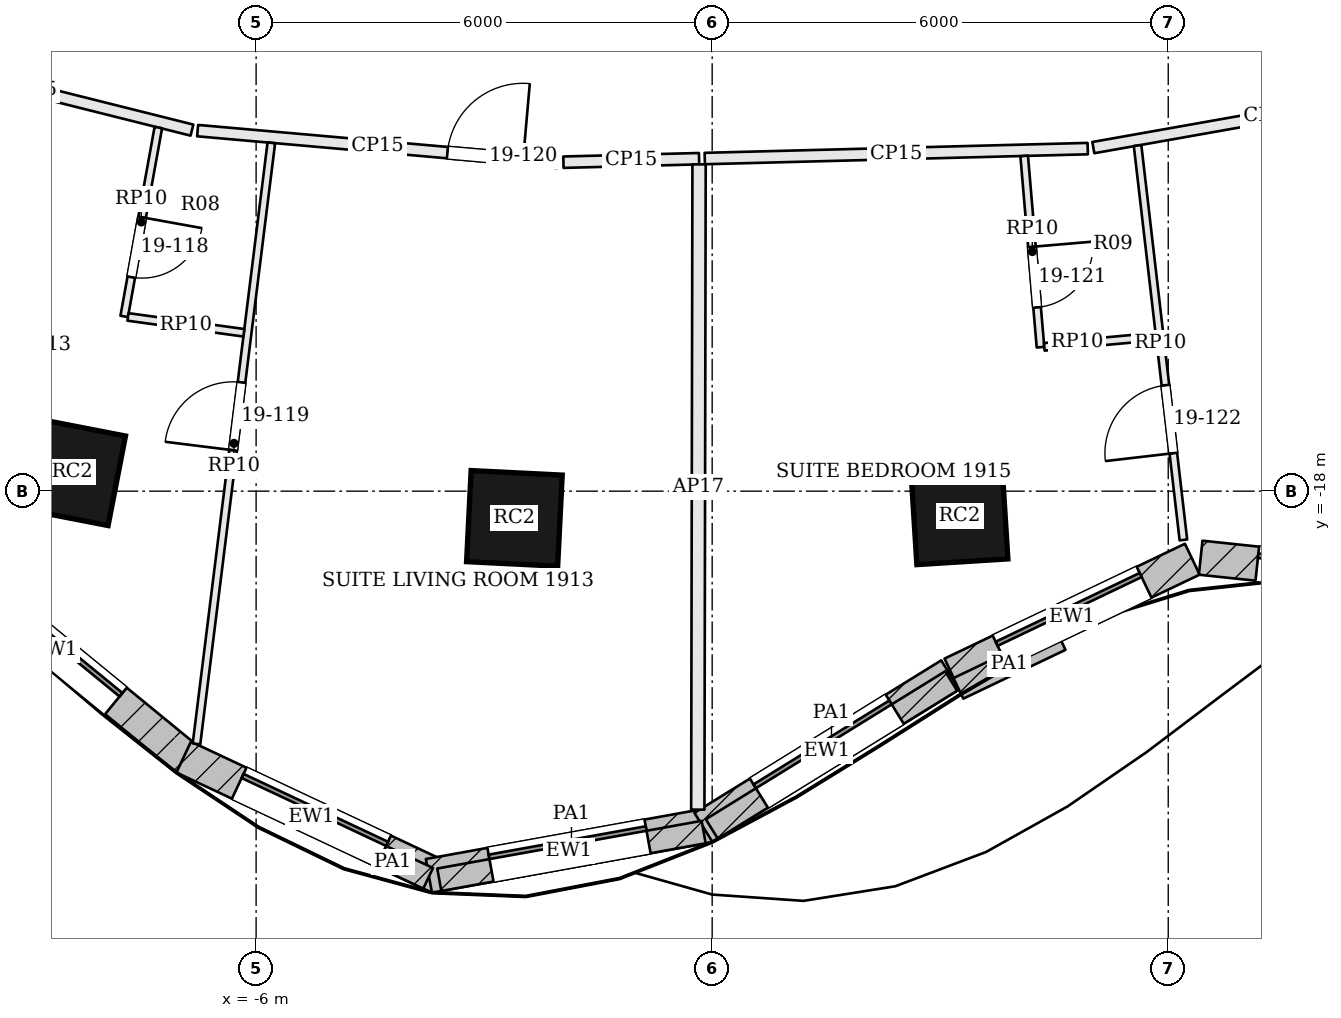
"""IFC4 building model, lengths in metres.
Left out: names, types, materials, properties, quantities, classifications, styles, units other than length and angle.
Written with IfcOpenShell. Run it as: python <this file> out.ifc"""

import sys

from ifc_helpers import new_model, si_unit, direction, frame, frame_2d, origin, origin_2d, place, context, subcontext, project, spatial, rectangle, extrude, element, fill, save


model = new_model("IFC4")
c1 = context("Model", 3, precision=1e-05, world=origin(), true_north=direction((0.0, 1.0)))
c2 = subcontext(c1, "Body", "Model", "MODEL_VIEW")
j1 = project(units=[si_unit("LENGTHUNIT", "METRE"), si_unit("PLANEANGLEUNIT", "RADIAN")], contexts=[c1])
p1 = place(None, origin())
s1 = spatial("IfcSite", under=j1, at=p1, CompositionType="ELEMENT")
p2 = place(p1, origin())
s2 = spatial("IfcBuilding", under=s1, at=p2, CompositionType="ELEMENT")
p3 = place(p2, frame((0.0, 0.0, 85.2)))
s3 = spatial("IfcBuildingStorey", under=s2, at=p3, CompositionType="ELEMENT", Elevation=85.2)
for number, where, z_axis, x_axis in (
    (1, (-8.422, -17.749, 0.0), (0.0, 0.0, 1.0), (0.982, -0.191, 0.0)),
    (2, (-2.602, -18.358, 0.0), (0.0, 0.0, 1.0), (0.999, -0.05, 0.0)),
    (3, (3.254, -18.33, 0.0), (0.0, 0.0, 1.0), (0.998, 0.063, 0.0)),
):
    element("IfcColumn", number, at=place(p3, frame(where, z_axis=z_axis, x_axis=x_axis)), inside=s3, PredefinedType="COLUMN", context=c2, shape_type="SweptSolid", body=[
        extrude(rectangle(XDim=1.2, YDim=1.2, at=origin_2d()), origin(), (0.0, 0.0, 1.0), 3.6),
    ])
p4 = place(p3, frame((-10.407, -18.661, 0.0), z_axis=(0.0, 0.0, 1.0), x_axis=(0.773702458947, -0.633549133864, 0.0)))
e4 = element("IfcWall", 4, at=p4, inside=s3, PredefinedType="SOLIDWALL", context=c2, shape_type="SweptSolid", body=[
    extrude(rectangle(XDim=4.526, YDim=0.45, at=frame_2d((2.263, 0.0))), origin(), (0.0, 0.0, 1.0), 3.4),
])
p5 = place(p4, frame((1.213, 0.0, 0.9)))
e5 = element("IfcOpeningElement", 5, at=p5, cuts=e4, PredefinedType="OPENING", context=c2, shape_type="SweptSolid", body=[
    extrude(rectangle(XDim=2.1, YDim=2.0, at=frame_2d((1.05, 1.0))), frame((0.0, 0.235, 0.0), z_axis=(0.0, -1.0, 0.0), x_axis=(1.0, 0.0, 0.0)), (0.0, 0.0, 1.0), 0.47),
])
p6 = place(p3, frame((-6.953, -21.499, 0.0), z_axis=(0.0, 0.0, 1.0), x_axis=(0.905034581957, -0.425337989676, 0.0)))
e6 = element("IfcWall", 6, at=p6, inside=s3, PredefinedType="SOLIDWALL", context=c2, shape_type="SweptSolid", body=[
    extrude(rectangle(XDim=3.714, YDim=0.45, at=frame_2d((1.857, 0.0))), origin(), (0.0, 0.0, 1.0), 3.4),
])
p7 = place(p6, frame((0.807, 0.0, 0.9)))
e7 = element("IfcOpeningElement", 7, at=p7, cuts=e6, PredefinedType="OPENING", context=c2, shape_type="SweptSolid", body=[
    extrude(rectangle(XDim=2.1, YDim=2.0, at=frame_2d((1.05, 1.0))), frame((0.0, 0.235, 0.0), z_axis=(0.0, -1.0, 0.0), x_axis=(1.0, 0.0, 0.0)), (0.0, 0.0, 1.0), 0.47),
])
p8 = place(p3, frame((-3.727, -23.061, 0.0), z_axis=(0.0, 0.0, 1.0), x_axis=(0.984119180424, 0.177508982087, 0.0)))
e8 = element("IfcWall", 8, at=p8, inside=s3, PredefinedType="SOLIDWALL", context=c2, shape_type="SweptSolid", body=[
    extrude(rectangle(XDim=3.747, YDim=0.45, at=frame_2d((1.873, 0.0))), origin(), (0.0, 0.0, 1.0), 3.4),
])
p9 = place(p8, frame((0.823, 0.0, 0.9)))
e9 = element("IfcOpeningElement", 9, at=p9, cuts=e8, PredefinedType="OPENING", context=c2, shape_type="SweptSolid", body=[
    extrude(rectangle(XDim=2.1, YDim=2.0, at=frame_2d((1.05, 1.0))), frame((0.0, 0.235, 0.0), z_axis=(0.0, -1.0, 0.0), x_axis=(1.0, 0.0, 0.0)), (0.0, 0.0, 1.0), 0.47),
])
p10 = place(p3, frame((-0.115, -22.424, 0.0), z_axis=(0.0, 0.0, 1.0), x_axis=(0.8506970368, 0.525656305564, 0.0)))
e10 = element("IfcWall", 10, at=p10, inside=s3, PredefinedType="SOLIDWALL", context=c2, shape_type="SweptSolid", body=[
    extrude(rectangle(XDim=3.816, YDim=0.45, at=frame_2d((1.908, 0.0))), origin(), (0.0, 0.0, 1.0), 3.4),
])
p11 = place(p10, frame((0.858, 0.0, 0.9)))
e11 = element("IfcOpeningElement", 11, at=p11, cuts=e10, PredefinedType="OPENING", context=c2, shape_type="SweptSolid", body=[
    extrude(rectangle(XDim=2.1, YDim=2.0, at=frame_2d((1.05, 1.0))), frame((0.0, 0.235, 0.0), z_axis=(0.0, -1.0, 0.0), x_axis=(1.0, 0.0, 0.0)), (0.0, 0.0, 1.0), 0.47),
])
p12 = place(p3, frame((3.154, -20.406, 0.0), z_axis=(0.0, 0.0, 1.0), x_axis=(0.902333313, 0.431038968367, 0.0)))
e12 = element("IfcWall", 12, at=p12, inside=s3, PredefinedType="SOLIDWALL", context=c2, shape_type="SweptSolid", body=[
    extrude(rectangle(XDim=3.505, YDim=0.45, at=frame_2d((1.753, 0.0))), origin(), (0.0, 0.0, 1.0), 3.4),
])
p13 = place(p12, frame((0.703, 0.0, 0.9)))
e13 = element("IfcOpeningElement", 13, at=p13, cuts=e12, PredefinedType="OPENING", context=c2, shape_type="SweptSolid", body=[
    extrude(rectangle(XDim=2.1, YDim=2.0, at=frame_2d((1.05, 1.0))), frame((0.0, 0.235, 0.0), z_axis=(0.0, -1.0, 0.0), x_axis=(1.0, 0.0, 0.0)), (0.0, 0.0, 1.0), 0.47),
])
p14 = place(p3, frame((6.427, -18.875, 0.0), z_axis=(0.0, 0.0, 1.0), x_axis=(0.994433468803, -0.10536638992, 0.0)))
e14 = element("IfcWall", 14, at=p14, inside=s3, PredefinedType="SOLIDWALL", context=c2, shape_type="SweptSolid", body=[
    extrude(rectangle(XDim=3.598, YDim=0.45, at=frame_2d((1.799, 0.0))), origin(), (0.0, 0.0, 1.0), 3.4),
])
p15 = place(p14, frame((0.749, 0.0, 0.9)))
e15 = element("IfcOpeningElement", 15, at=p15, cuts=e14, PredefinedType="OPENING", context=c2, shape_type="SweptSolid", body=[
    extrude(rectangle(XDim=2.1, YDim=2.0, at=frame_2d((1.05, 1.0))), frame((0.0, 0.235, 0.0), z_axis=(0.0, -1.0, 0.0), x_axis=(1.0, 0.0, 0.0)), (0.0, 0.0, 1.0), 0.47),
])
p16 = place(p3, frame((-4.667, -22.656, 3.6), z_axis=(0.0, 0.0, 1.0), x_axis=(0.905050240273, -0.425304670304, 0.0)))
e16 = element("IfcWall", 16, at=p16, inside=s3, PredefinedType="PARAPET", context=c2, shape_type="SweptSolid", body=[
    extrude(rectangle(XDim=1.027, YDim=0.3, at=frame_2d((0.513, 0.0))), origin(), (0.0, 0.0, 1.0), 1.1),
])
p17 = place(p3, frame((-3.59, -23.112, 3.6), z_axis=(0.0, 0.0, 1.0), x_axis=(0.984124248147, 0.177480884064, 0.0)))
e17 = element("IfcWall", 17, at=p17, inside=s3, PredefinedType="PARAPET", context=c2, shape_type="SweptSolid", body=[
    extrude(rectangle(XDim=3.534, YDim=0.3, at=frame_2d((1.767, 0.0))), origin(), (0.0, 0.0, 1.0), 1.1),
])
p18 = place(p3, frame((-0.005, -22.444, 3.6), z_axis=(0.0, 0.0, 1.0), x_axis=(0.850710394144, 0.525634688063, 0.0)))
e18 = element("IfcWall", 18, at=p18, inside=s3, PredefinedType="PARAPET", context=c2, shape_type="SweptSolid", body=[
    extrude(rectangle(XDim=3.702, YDim=0.3, at=frame_2d((1.851, 0.0))), origin(), (0.0, 0.0, 1.0), 1.1),
])
p19 = place(p3, frame((3.239, -20.594, 3.6), z_axis=(0.0, 0.0, 1.0), x_axis=(0.902344893923, 0.431014724123, 0.0)))
e19 = element("IfcWall", 19, at=p19, inside=s3, PredefinedType="PARAPET", context=c2, shape_type="SweptSolid", body=[
    extrude(rectangle(XDim=1.49, YDim=0.3, at=frame_2d((0.745, 0.0))), origin(), (0.0, 0.0, 1.0), 1.1),
])
p20 = place(p3, frame((-11.101, -12.183, 0.0), z_axis=(0.0, 0.0, 1.0), x_axis=(0.969991763536, -0.24313777714, 0.0)))
e20 = element("IfcWall", 20, at=p20, inside=s3, PredefinedType="PARTITIONING", context=c2, shape_type="SweptSolid", body=[
    extrude(rectangle(XDim=4.388, YDim=0.15, at=frame_2d((2.194, 0.0))), origin(), (0.0, 0.0, 1.0), 2.784),
])
p21 = place(p3, frame((-6.77, -13.257, 0.0), z_axis=(0.0, 0.0, 1.0), x_axis=(0.996139758015, -0.08778144737, 0.0)))
e21 = element("IfcWall", 21, at=p21, inside=s3, PredefinedType="PARTITIONING", context=c2, shape_type="SweptSolid", body=[
    extrude(rectangle(XDim=4.756, YDim=0.15, at=frame_2d((2.378, 0.0))), origin(), (0.0, 0.0, 1.0), 2.784),
])
p22 = place(p21, frame((3.299, 0.0, 0.0)))
e22 = element("IfcOpeningElement", 22, at=p22, cuts=e21, PredefinedType="OPENING", context=c2, shape_type="SweptSolid", body=[
    extrude(rectangle(XDim=1.0, YDim=2.1, at=frame_2d((0.5, 1.05))), frame((0.0, 0.085, 0.0), z_axis=(0.0, -1.0, 0.0), x_axis=(1.0, 0.0, 0.0)), (0.0, 0.0, 1.0), 0.17),
])
p23 = place(p3, frame((-1.957, -13.672, 0.0), z_axis=(0.0, 0.0, 1.0), x_axis=(0.999665927146, 0.025846355709, 0.0)))
e23 = element("IfcWall", 23, at=p23, inside=s3, PredefinedType="PARTITIONING", context=c2, shape_type="SweptSolid", body=[
    extrude(rectangle(XDim=1.785, YDim=0.15, at=frame_2d((0.893, 0.0))), origin(), (0.0, 0.0, 1.0), 2.784),
])
p24 = place(p3, frame((-0.189, -22.19, 0.0), z_axis=(0.0, 0.0, 1.0), x_axis=(0.001984465463, 0.999998030946, 0.0)))
e24 = element("IfcWall", 24, at=p24, inside=s3, PredefinedType="PARTITIONING", context=c2, shape_type="SweptSolid", body=[
    extrude(rectangle(XDim=8.489, YDim=0.175, at=frame_2d((4.244, 0.0))), origin(), (0.0, 0.0, 1.0), 2.784),
])
p25 = place(p3, frame((-0.097, -13.624, 0.0), z_axis=(0.0, 0.0, 1.0), x_axis=(0.999664134342, 0.025915603618, 0.0)))
e25 = element("IfcWall", 25, at=p25, inside=s3, PredefinedType="PARTITIONING", context=c2, shape_type="SweptSolid", body=[
    extrude(rectangle(XDim=5.04, YDim=0.15, at=frame_2d((2.52, 0.0))), origin(), (0.0, 0.0, 1.0), 2.784),
])
p26 = place(p3, frame((5.015, -13.48, 0.0), z_axis=(0.0, 0.0, 1.0), x_axis=(0.984637772103, 0.174609443467, 0.0)))
e26 = element("IfcWall", 26, at=p26, inside=s3, PredefinedType="PARTITIONING", context=c2, shape_type="SweptSolid", body=[
    extrude(rectangle(XDim=4.715, YDim=0.15, at=frame_2d((2.357, 0.0))), origin(), (0.0, 0.0, 1.0), 2.784),
])
p27 = place(p26, frame((3.272, 0.0, 0.0)))
e27 = element("IfcOpeningElement", 27, at=p27, cuts=e26, PredefinedType="OPENING", context=c2, shape_type="SweptSolid", body=[
    extrude(rectangle(XDim=1.0, YDim=2.1, at=frame_2d((0.5, 1.05))), frame((0.0, 0.085, 0.0), z_axis=(0.0, -1.0, 0.0), x_axis=(1.0, 0.0, 0.0)), (0.0, 0.0, 1.0), 0.17),
])
p28 = place(p3, frame((-6.784, -21.325, 0.0), z_axis=(0.0, 0.0, 1.0), x_axis=(0.123563365561, 0.992336684141, 0.0)))
e28 = element("IfcWall", 28, at=p28, inside=s3, PredefinedType="PARTITIONING", context=c2, shape_type="SweptSolid", body=[
    extrude(rectangle(XDim=7.969, YDim=0.1, at=frame_2d((3.984, 0.0))), origin(), (0.0, 0.0, 1.0), 2.784),
])
p29 = place(p28, frame((3.893, 0.0, 0.0)))
e29 = element("IfcOpeningElement", 29, at=p29, cuts=e28, PredefinedType="OPENING", context=c2, shape_type="SweptSolid", body=[
    extrude(rectangle(XDim=0.9, YDim=2.4, at=frame_2d((0.45, 1.2))), frame((0.0, 0.06, 0.0), z_axis=(0.0, -1.0, 0.0), x_axis=(1.0, 0.0, 0.0)), (0.0, 0.0, 1.0), 0.12),
])
p30 = place(p3, frame((-7.286, -13.216, 0.0), z_axis=(0.0, 0.0, 1.0), x_axis=(-0.177915325958, -0.984045800148, 0.0)))
e30 = element("IfcWall", 30, at=p30, inside=s3, PredefinedType="PARTITIONING", context=c2, shape_type="SweptSolid", body=[
    extrude(rectangle(XDim=2.525, YDim=0.1, at=frame_2d((1.262, 0.0))), origin(), (0.0, 0.0, 1.0), 2.784),
])
p31 = place(p30, frame((1.2, 0.0, 0.0)))
e31 = element("IfcOpeningElement", 31, at=p31, cuts=e30, PredefinedType="OPENING", context=c2, shape_type="SweptSolid", body=[
    extrude(rectangle(XDim=0.8, YDim=2.1, at=frame_2d((0.4, 1.05))), frame((0.0, 0.06, 0.0), z_axis=(0.0, -1.0, 0.0), x_axis=(1.0, 0.0, 0.0)), (0.0, 0.0, 1.0), 0.12),
])
p32 = place(p3, frame((-7.686, -15.708, 0.0), z_axis=(0.0, 0.0, 1.0), x_axis=(0.990778929456, -0.13548842366, 0.0)))
e32 = element("IfcWall", 32, at=p32, inside=s3, PredefinedType="PARTITIONING", context=c2, shape_type="SweptSolid", body=[
    extrude(rectangle(XDim=1.539, YDim=0.1, at=frame_2d((0.77, 0.0))), origin(), (0.0, 0.0, 1.0), 2.784),
])
p33 = place(p3, frame((6.199, -18.642, 0.0), z_axis=(0.0, 0.0, 1.0), x_axis=(-0.115390402635, 0.993320217744, 0.0)))
e33 = element("IfcWall", 33, at=p33, inside=s3, PredefinedType="PARTITIONING", context=c2, shape_type="SweptSolid", body=[
    extrude(rectangle(XDim=5.224, YDim=0.1, at=frame_2d((2.612, 0.0))), origin(), (0.0, 0.0, 1.0), 2.784),
])
p34 = place(p33, frame((1.149, 0.0, 0.0)))
e34 = element("IfcOpeningElement", 34, at=p34, cuts=e33, PredefinedType="OPENING", context=c2, shape_type="SweptSolid", body=[
    extrude(rectangle(XDim=0.9, YDim=2.4, at=frame_2d((0.45, 1.2))), frame((0.0, 0.06, 0.0), z_axis=(0.0, -1.0, 0.0), x_axis=(1.0, 0.0, 0.0)), (0.0, 0.0, 1.0), 0.12),
])
p35 = place(p3, frame((4.105, -13.59, 0.0), z_axis=(0.0, 0.0, 1.0), x_axis=(0.084989774177, -0.996381823542, 0.0)))
e35 = element("IfcWall", 35, at=p35, inside=s3, PredefinedType="PARTITIONING", context=c2, shape_type="SweptSolid", body=[
    extrude(rectangle(XDim=2.525, YDim=0.1, at=frame_2d((1.262, 0.0))), origin(), (0.0, 0.0, 1.0), 2.784),
])
p36 = place(p35, frame((1.2, 0.0, 0.0)))
e36 = element("IfcOpeningElement", 36, at=p36, cuts=e35, PredefinedType="OPENING", context=c2, shape_type="SweptSolid", body=[
    extrude(rectangle(XDim=0.8, YDim=2.1, at=frame_2d((0.4, 1.05))), frame((0.0, 0.06, 0.0), z_axis=(0.0, -1.0, 0.0), x_axis=(1.0, 0.0, 0.0)), (0.0, 0.0, 1.0), 0.12),
])
p37 = place(p3, frame((4.369, -16.101, 0.0), z_axis=(0.0, 0.0, 1.0), x_axis=(0.995788091421, 0.09168466057, 0.0)))
e37 = element("IfcWall", 37, at=p37, inside=s3, PredefinedType="PARTITIONING", context=c2, shape_type="SweptSolid", body=[
    extrude(rectangle(XDim=1.475, YDim=0.1, at=frame_2d((0.738, 0.0))), origin(), (0.0, 0.0, 1.0), 2.784),
])
p38 = place(p5, origin())
e38 = element("IfcWindow", 38, at=p38, inside=s3, PartitioningType="SINGLE_PANEL", PredefinedType="WINDOW", context=c2, shape_type="SweptSolid", body=[
    extrude(rectangle(XDim=2.1, YDim=2.0, at=frame_2d((1.05, 1.0))), frame((0.0, 0.135, 0.0), z_axis=(0.0, -1.0, 0.0), x_axis=(1.0, 0.0, 0.0)), (0.0, 0.0, 1.0), 0.06),
])
fill(e5, e38)
p39 = place(p7, origin())
e39 = element("IfcWindow", 39, at=p39, inside=s3, PartitioningType="SINGLE_PANEL", PredefinedType="WINDOW", context=c2, shape_type="SweptSolid", body=[
    extrude(rectangle(XDim=2.1, YDim=2.0, at=frame_2d((1.05, 1.0))), frame((0.0, 0.135, 0.0), z_axis=(0.0, -1.0, 0.0), x_axis=(1.0, 0.0, 0.0)), (0.0, 0.0, 1.0), 0.06),
])
fill(e7, e39)
p40 = place(p9, origin())
e40 = element("IfcWindow", 40, at=p40, inside=s3, PartitioningType="SINGLE_PANEL", PredefinedType="WINDOW", context=c2, shape_type="SweptSolid", body=[
    extrude(rectangle(XDim=2.1, YDim=2.0, at=frame_2d((1.05, 1.0))), frame((0.0, 0.135, 0.0), z_axis=(0.0, -1.0, 0.0), x_axis=(1.0, 0.0, 0.0)), (0.0, 0.0, 1.0), 0.06),
])
fill(e9, e40)
p41 = place(p11, origin())
e41 = element("IfcWindow", 41, at=p41, inside=s3, PartitioningType="SINGLE_PANEL", PredefinedType="WINDOW", context=c2, shape_type="SweptSolid", body=[
    extrude(rectangle(XDim=2.1, YDim=2.0, at=frame_2d((1.05, 1.0))), frame((0.0, 0.135, 0.0), z_axis=(0.0, -1.0, 0.0), x_axis=(1.0, 0.0, 0.0)), (0.0, 0.0, 1.0), 0.06),
])
fill(e11, e41)
p42 = place(p13, origin())
e42 = element("IfcWindow", 42, at=p42, inside=s3, PartitioningType="SINGLE_PANEL", PredefinedType="WINDOW", context=c2, shape_type="SweptSolid", body=[
    extrude(rectangle(XDim=2.1, YDim=2.0, at=frame_2d((1.05, 1.0))), frame((0.0, 0.135, 0.0), z_axis=(0.0, -1.0, 0.0), x_axis=(1.0, 0.0, 0.0)), (0.0, 0.0, 1.0), 0.06),
])
fill(e13, e42)
p43 = place(p15, origin())
e43 = element("IfcWindow", 43, at=p43, inside=s3, PartitioningType="SINGLE_PANEL", PredefinedType="WINDOW", context=c2, shape_type="SweptSolid", body=[
    extrude(rectangle(XDim=2.1, YDim=2.0, at=frame_2d((1.05, 1.0))), frame((0.0, 0.135, 0.0), z_axis=(0.0, -1.0, 0.0), x_axis=(1.0, 0.0, 0.0)), (0.0, 0.0, 1.0), 0.06),
])
fill(e15, e43)
p44 = place(p31, origin())
e44 = element("IfcDoor", 44, at=p44, inside=s3, OperationType="SINGLE_SWING_LEFT", PredefinedType="DOOR", context=c2, shape_type="SweptSolid", body=[
    extrude(rectangle(XDim=0.8, YDim=2.1, at=frame_2d((0.4, 1.05))), frame((0.0, 0.025, 0.0), z_axis=(0.0, -1.0, 0.0), x_axis=(1.0, 0.0, 0.0)), (0.0, 0.0, 1.0), 0.05),
])
fill(e31, e44)
p45 = place(p29, origin())
e45 = element("IfcDoor", 45, at=p45, inside=s3, OperationType="SINGLE_SWING_LEFT", PredefinedType="DOOR", context=c2, shape_type="SweptSolid", body=[
    extrude(rectangle(XDim=0.9, YDim=2.4, at=frame_2d((0.45, 1.2))), frame((0.0, 0.025, 0.0), z_axis=(0.0, -1.0, 0.0), x_axis=(1.0, 0.0, 0.0)), (0.0, 0.0, 1.0), 0.05),
])
fill(e29, e45)
p46 = place(p22, origin())
e46 = element("IfcDoor", 46, at=p46, inside=s3, OperationType="SINGLE_SWING_RIGHT", PredefinedType="DOOR", context=c2, shape_type="SweptSolid", body=[
    extrude(rectangle(XDim=1.0, YDim=2.1, at=frame_2d((0.5, 1.05))), frame((0.0, 0.025, 0.0), z_axis=(0.0, -1.0, 0.0), x_axis=(1.0, 0.0, 0.0)), (0.0, 0.0, 1.0), 0.05),
])
fill(e22, e46)
p47 = place(p36, origin())
e47 = element("IfcDoor", 47, at=p47, inside=s3, OperationType="SINGLE_SWING_LEFT", PredefinedType="DOOR", context=c2, shape_type="SweptSolid", body=[
    extrude(rectangle(XDim=0.8, YDim=2.1, at=frame_2d((0.4, 1.05))), frame((0.0, 0.025, 0.0), z_axis=(0.0, -1.0, 0.0), x_axis=(1.0, 0.0, 0.0)), (0.0, 0.0, 1.0), 0.05),
])
fill(e36, e47)
p48 = place(p34, origin())
e48 = element("IfcDoor", 48, at=p48, inside=s3, OperationType="SINGLE_SWING_LEFT", PredefinedType="DOOR", context=c2, shape_type="SweptSolid", body=[
    extrude(rectangle(XDim=0.9, YDim=2.4, at=frame_2d((0.45, 1.2))), frame((0.0, 0.025, 0.0), z_axis=(0.0, -1.0, 0.0), x_axis=(1.0, 0.0, 0.0)), (0.0, 0.0, 1.0), 0.05),
])
fill(e34, e48)
save(model, sys.argv[1])
